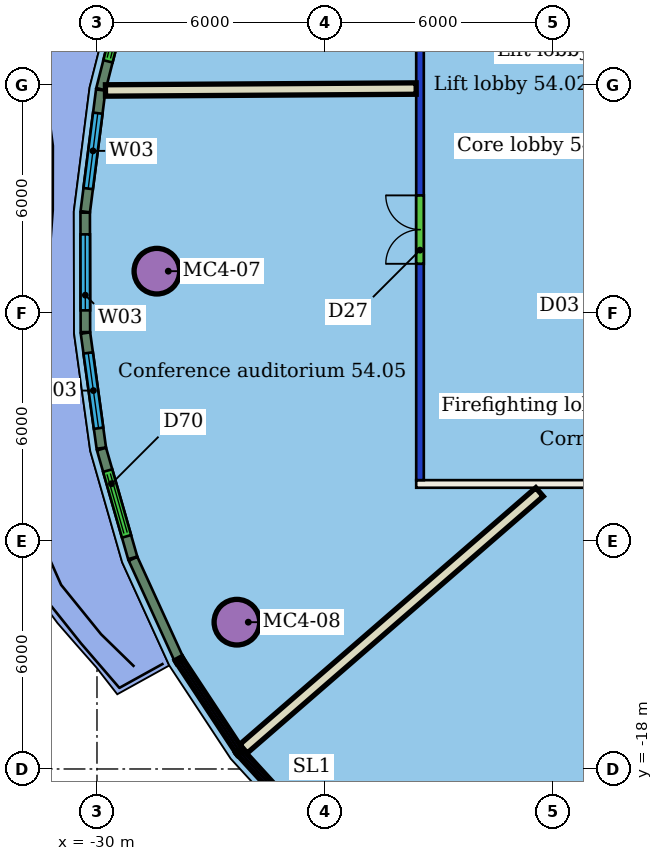
"""IFC4 building model, lengths in metres.
Left out: names, types, materials, properties, quantities, classifications, styles, units other than length and angle.
Written with IfcOpenShell. Run it as: python <this file> out.ifc"""

import sys

from ifc_helpers import new_model, si_unit, direction, frame, frame_2d, origin, origin_2d, place, context, subcontext, project, spatial, rectangle, hollow_circle, extrude, element, fill, save


model = new_model("IFC4")
c1 = context("Model", 3, precision=1e-05, world=origin(), true_north=direction((0.0, 1.0)))
c2 = subcontext(c1, "Body", "Model", "MODEL_VIEW")
j1 = project(units=[si_unit("LENGTHUNIT", "METRE"), si_unit("PLANEANGLEUNIT", "RADIAN")], contexts=[c1])
p1 = place(None, origin())
s1 = spatial("IfcSite", under=j1, at=p1, CompositionType="ELEMENT")
p2 = place(p1, origin())
s2 = spatial("IfcBuilding", under=s1, at=p2, CompositionType="ELEMENT")
p3 = place(p2, frame((0.0, 0.0, 220.9)))
s3 = spatial("IfcBuildingStorey", under=s2, at=p3, CompositionType="ELEMENT", Elevation=220.9)
for number, where, z_axis, x_axis in (
    (1, (-28.424, -4.901, 0.0), (0.0, 0.0, 1.0), (1.0, 0.0, 0.0)),
    (2, (-26.318, -14.137, 0.0), (0.0, 0.0, 1.0), (1.0, 0.0, 0.0)),
):
    element("IfcColumn", number, at=place(p3, frame(where, z_axis=z_axis, x_axis=x_axis)), inside=s3, PredefinedType="COLUMN", context=c2, shape_type="SweptSolid", body=[
        extrude(hollow_circle(Radius=0.6, WallThickness=0.045, at=origin_2d()), origin(), (0.0, 0.0, 1.0), 3.45),
    ])
p4 = place(p3, frame((9.6, -10.5, 0.0), z_axis=(0.0, 0.0, 1.0), x_axis=(-1.0, 0.0, 0.0)))
e3 = element("IfcWall", 3, at=p4, inside=s3, PredefinedType="PARTITIONING", context=c2, shape_type="SweptSolid", body=[
    extrude(rectangle(XDim=31.2, YDim=0.2, at=frame_2d((15.6, 0.0))), origin(), (0.0, 0.0, 1.0), 3.45),
])
p5 = place(p4, frame((18.444, 0.0, 0.0)))
e4 = element("IfcOpeningElement", 4, at=p5, cuts=e3, PredefinedType="OPENING", context=c2, shape_type="SweptSolid", body=[
    extrude(rectangle(XDim=1.8, YDim=2.1, at=frame_2d((0.9, 1.05))), frame((0.0, 0.11, 0.0), z_axis=(0.0, -1.0, 0.0), x_axis=(1.0, 0.0, 0.0)), (0.0, 0.0, 1.0), 0.22),
])
p6 = place(p4, frame((12.487, 0.0, 0.0)))
e5 = element("IfcOpeningElement", 5, at=p6, cuts=e3, PredefinedType="OPENING", context=c2, shape_type="SweptSolid", body=[
    extrude(rectangle(XDim=1.2, YDim=2.4, at=frame_2d((0.6, 1.2))), frame((0.0, 0.11, 0.0), z_axis=(0.0, -1.0, 0.0), x_axis=(1.0, 0.0, 0.0)), (0.0, 0.0, 1.0), 0.22),
])
p7 = place(p4, frame((8.536, 0.0, 0.0)))
e6 = element("IfcOpeningElement", 6, at=p7, cuts=e3, PredefinedType="OPENING", context=c2, shape_type="SweptSolid", body=[
    extrude(rectangle(XDim=1.0, YDim=2.4, at=frame_2d((0.5, 1.2))), frame((0.0, 0.11, 0.0), z_axis=(0.0, -1.0, 0.0), x_axis=(1.0, 0.0, 0.0)), (0.0, 0.0, 1.0), 0.22),
])
p8 = place(p4, frame((4.288, 0.0, 0.0)))
e7 = element("IfcOpeningElement", 7, at=p8, cuts=e3, PredefinedType="OPENING", context=c2, shape_type="SweptSolid", body=[
    extrude(rectangle(XDim=1.0, YDim=2.4, at=frame_2d((0.5, 1.2))), frame((0.0, 0.11, 0.0), z_axis=(0.0, -1.0, 0.0), x_axis=(1.0, 0.0, 0.0)), (0.0, 0.0, 1.0), 0.22),
])
p9 = place(p3, frame((-21.5, -10.4, 0.0), z_axis=(0.0, 0.0, 1.0), x_axis=(0.0, 1.0, 0.0)))
e8 = element("IfcWall", 8, at=p9, inside=s3, PredefinedType="PARTITIONING", context=c2, shape_type="SweptSolid", body=[
    extrude(rectangle(XDim=20.8, YDim=0.2, at=frame_2d((10.4, 0.0))), origin(), (0.0, 0.0, 1.0), 3.05),
])
p10 = place(p9, frame((13.413, 0.0, 0.0)))
e9 = element("IfcOpeningElement", 9, at=p10, cuts=e8, PredefinedType="OPENING", context=c2, shape_type="SweptSolid", body=[
    extrude(rectangle(XDim=1.0, YDim=2.4, at=frame_2d((0.5, 1.2))), frame((0.0, 0.11, 0.0), z_axis=(0.0, -1.0, 0.0), x_axis=(1.0, 0.0, 0.0)), (0.0, 0.0, 1.0), 0.22),
])
p11 = place(p9, frame((5.693, 0.0, 0.0)))
e10 = element("IfcOpeningElement", 10, at=p11, cuts=e8, PredefinedType="OPENING", context=c2, shape_type="SweptSolid", body=[
    extrude(rectangle(XDim=1.8, YDim=2.4, at=frame_2d((0.9, 1.2))), frame((0.0, 0.11, 0.0), z_axis=(0.0, -1.0, 0.0), x_axis=(1.0, 0.0, 0.0)), (0.0, 0.0, 1.0), 0.22),
])
p12 = place(p3, frame((-29.777, -0.147, 0.0), z_axis=(0.0, 0.0, 1.0), x_axis=(0.999980897338, 0.006181016028, 0.0)))
e11 = element("IfcWall", 11, at=p12, inside=s3, PredefinedType="PARTITIONING", context=c2, shape_type="SweptSolid", body=[
    extrude(rectangle(XDim=8.176, YDim=0.3, at=frame_2d((4.088, 0.0))), origin(), (0.0, 0.0, 1.0), 3.45),
])
p13 = place(p3, frame((-26.146, -17.469, 0.0), z_axis=(0.0, 0.0, 1.0), x_axis=(0.755515634714, 0.655130617284, 0.0)))
e12 = element("IfcWall", 12, at=p13, inside=s3, PredefinedType="PARTITIONING", context=c2, shape_type="SweptSolid", body=[
    extrude(rectangle(XDim=10.312, YDim=0.3, at=frame_2d((5.156, 0.0))), origin(), (0.0, 0.0, 1.0), 3.45),
])
p14 = place(p3, frame((-29.082, 3.096, 0.0), z_axis=(0.0, 0.0, 1.0), x_axis=(-0.246300133035, -0.969193605255, 0.0)))
e13 = element("IfcWall", 13, at=p14, inside=s3, PredefinedType="SOLIDWALL", context=c2, shape_type="SweptSolid", body=[
    extrude(rectangle(XDim=3.31, YDim=0.25, at=frame_2d((1.655, 0.0))), origin(), (0.0, 0.0, 1.0), 3.1),
])
p15 = place(p14, frame((0.755, 0.0, 0.0)))
e14 = element("IfcOpeningElement", 14, at=p15, cuts=e13, PredefinedType="OPENING", context=c2, shape_type="SweptSolid", body=[
    extrude(rectangle(XDim=1.8, YDim=2.4, at=frame_2d((0.9, 1.2))), frame((0.0, 0.135, 0.0), z_axis=(0.0, -1.0, 0.0), x_axis=(1.0, 0.0, 0.0)), (0.0, 0.0, 1.0), 0.27),
])
p16 = place(p3, frame((-29.901, -0.135, 0.0), z_axis=(0.0, 0.0, 1.0), x_axis=(-0.126351687355, -0.991985509522, 0.0)))
e15 = element("IfcWall", 15, at=p16, inside=s3, PredefinedType="SOLIDWALL", context=c2, shape_type="SweptSolid", body=[
    extrude(rectangle(XDim=3.229, YDim=0.25, at=frame_2d((1.614, 0.0))), origin(), (0.0, 0.0, 1.0), 3.1),
])
p17 = place(p16, frame((0.614, 0.0, 0.9)))
e16 = element("IfcOpeningElement", 16, at=p17, cuts=e15, PredefinedType="OPENING", context=c2, shape_type="SweptSolid", body=[
    extrude(rectangle(XDim=2.0, YDim=2.1, at=frame_2d((1.0, 1.05))), frame((0.0, 0.135, 0.0), z_axis=(0.0, -1.0, 0.0), x_axis=(1.0, 0.0, 0.0)), (0.0, 0.0, 1.0), 0.27),
])
p18 = place(p3, frame((-30.31, -3.362, 0.0), z_axis=(0.0, 0.0, 1.0), x_axis=(0.001631445933, -0.999998669191, 0.0)))
e17 = element("IfcWall", 17, at=p18, inside=s3, PredefinedType="SOLIDWALL", context=c2, shape_type="SweptSolid", body=[
    extrude(rectangle(XDim=3.143, YDim=0.25, at=frame_2d((1.571, 0.0))), origin(), (0.0, 0.0, 1.0), 3.1),
])
p19 = place(p18, frame((0.571, 0.0, 0.9)))
e18 = element("IfcOpeningElement", 18, at=p19, cuts=e17, PredefinedType="OPENING", context=c2, shape_type="SweptSolid", body=[
    extrude(rectangle(XDim=2.0, YDim=2.1, at=frame_2d((1.0, 1.05))), frame((0.0, 0.135, 0.0), z_axis=(0.0, -1.0, 0.0), x_axis=(1.0, 0.0, 0.0)), (0.0, 0.0, 1.0), 0.27),
])
p20 = place(p3, frame((-30.303, -6.529, 0.0), z_axis=(0.0, 0.0, 1.0), x_axis=(0.136556327804, -0.99063230784, 0.0)))
e19 = element("IfcWall", 19, at=p20, inside=s3, PredefinedType="SOLIDWALL", context=c2, shape_type="SweptSolid", body=[
    extrude(rectangle(XDim=3.057, YDim=0.25, at=frame_2d((1.529, 0.0))), origin(), (0.0, 0.0, 1.0), 3.1),
])
p21 = place(p20, frame((0.529, 0.0, 0.9)))
e20 = element("IfcOpeningElement", 20, at=p21, cuts=e19, PredefinedType="OPENING", context=c2, shape_type="SweptSolid", body=[
    extrude(rectangle(XDim=2.0, YDim=2.1, at=frame_2d((1.0, 1.05))), frame((0.0, 0.135, 0.0), z_axis=(0.0, -1.0, 0.0), x_axis=(1.0, 0.0, 0.0)), (0.0, 0.0, 1.0), 0.27),
])
p22 = place(p3, frame((-29.881, -9.583, 0.0), z_axis=(0.0, 0.0, 1.0), x_axis=(0.275630564499, -0.961263643292, 0.0)))
e21 = element("IfcWall", 21, at=p22, inside=s3, PredefinedType="SOLIDWALL", context=c2, shape_type="SweptSolid", body=[
    extrude(rectangle(XDim=2.978, YDim=0.25, at=frame_2d((1.489, 0.0))), origin(), (0.0, 0.0, 1.0), 3.1),
])
p23 = place(p22, frame((0.589, 0.0, 0.0)))
e22 = element("IfcOpeningElement", 22, at=p23, cuts=e21, PredefinedType="OPENING", context=c2, shape_type="SweptSolid", body=[
    extrude(rectangle(XDim=1.8, YDim=2.4, at=frame_2d((0.9, 1.2))), frame((0.0, 0.135, 0.0), z_axis=(0.0, -1.0, 0.0), x_axis=(1.0, 0.0, 0.0)), (0.0, 0.0, 1.0), 0.27),
])
p24 = place(p3, frame((-29.051, -12.47, 0.0), z_axis=(0.0, 0.0, 1.0), x_axis=(0.41529540963, -0.909686606882, 0.0)))
e23 = element("IfcWall", 23, at=p24, inside=s3, PredefinedType="SOLIDWALL", context=c2, shape_type="SweptSolid", body=[
    extrude(rectangle(XDim=2.871, YDim=0.25, at=frame_2d((1.435, 0.0))), origin(), (0.0, 0.0, 1.0), 3.1),
])
p25 = place(p11, origin())
e24 = element("IfcDoor", 24, at=p25, inside=s3, OperationType="DOUBLE_DOOR_SINGLE_SWING", PredefinedType="DOOR", context=c2, shape_type="SweptSolid", body=[
    extrude(rectangle(XDim=1.8, YDim=2.4, at=frame_2d((0.9, 1.2))), frame((0.0, 0.025, 0.0), z_axis=(0.0, -1.0, 0.0), x_axis=(1.0, 0.0, 0.0)), (0.0, 0.0, 1.0), 0.05),
])
fill(e10, e24)
p26 = place(p15, origin())
e25 = element("IfcDoor", 25, at=p26, inside=s3, OperationType="DOUBLE_DOOR_SLIDING", PredefinedType="DOOR", context=c2, shape_type="SweptSolid", body=[
    extrude(rectangle(XDim=1.8, YDim=2.4, at=frame_2d((0.9, 1.2))), frame((0.0, 0.025, 0.0), z_axis=(0.0, -1.0, 0.0), x_axis=(1.0, 0.0, 0.0)), (0.0, 0.0, 1.0), 0.05),
])
fill(e14, e25)
p27 = place(p17, origin())
e26 = element("IfcWindow", 26, at=p27, inside=s3, PartitioningType="SINGLE_PANEL", PredefinedType="WINDOW", context=c2, shape_type="SweptSolid", body=[
    extrude(rectangle(XDim=2.0, YDim=2.1, at=frame_2d((1.0, 1.05))), frame((0.0, 0.03, 0.0), z_axis=(0.0, -1.0, 0.0), x_axis=(1.0, 0.0, 0.0)), (0.0, 0.0, 1.0), 0.06),
])
fill(e16, e26)
p28 = place(p19, origin())
e27 = element("IfcWindow", 27, at=p28, inside=s3, PartitioningType="SINGLE_PANEL", PredefinedType="WINDOW", context=c2, shape_type="SweptSolid", body=[
    extrude(rectangle(XDim=2.0, YDim=2.1, at=frame_2d((1.0, 1.05))), frame((0.0, 0.03, 0.0), z_axis=(0.0, -1.0, 0.0), x_axis=(1.0, 0.0, 0.0)), (0.0, 0.0, 1.0), 0.06),
])
fill(e18, e27)
p29 = place(p21, origin())
e28 = element("IfcWindow", 28, at=p29, inside=s3, PartitioningType="SINGLE_PANEL", PredefinedType="WINDOW", context=c2, shape_type="SweptSolid", body=[
    extrude(rectangle(XDim=2.0, YDim=2.1, at=frame_2d((1.0, 1.05))), frame((0.0, 0.03, 0.0), z_axis=(0.0, -1.0, 0.0), x_axis=(1.0, 0.0, 0.0)), (0.0, 0.0, 1.0), 0.06),
])
fill(e20, e28)
p30 = place(p23, origin())
e29 = element("IfcDoor", 29, at=p30, inside=s3, OperationType="DOUBLE_DOOR_SLIDING", PredefinedType="DOOR", context=c2, shape_type="SweptSolid", body=[
    extrude(rectangle(XDim=1.8, YDim=2.4, at=frame_2d((0.9, 1.2))), frame((0.0, 0.025, 0.0), z_axis=(0.0, -1.0, 0.0), x_axis=(1.0, 0.0, 0.0)), (0.0, 0.0, 1.0), 0.05),
])
fill(e22, e29)
save(model, sys.argv[1])
